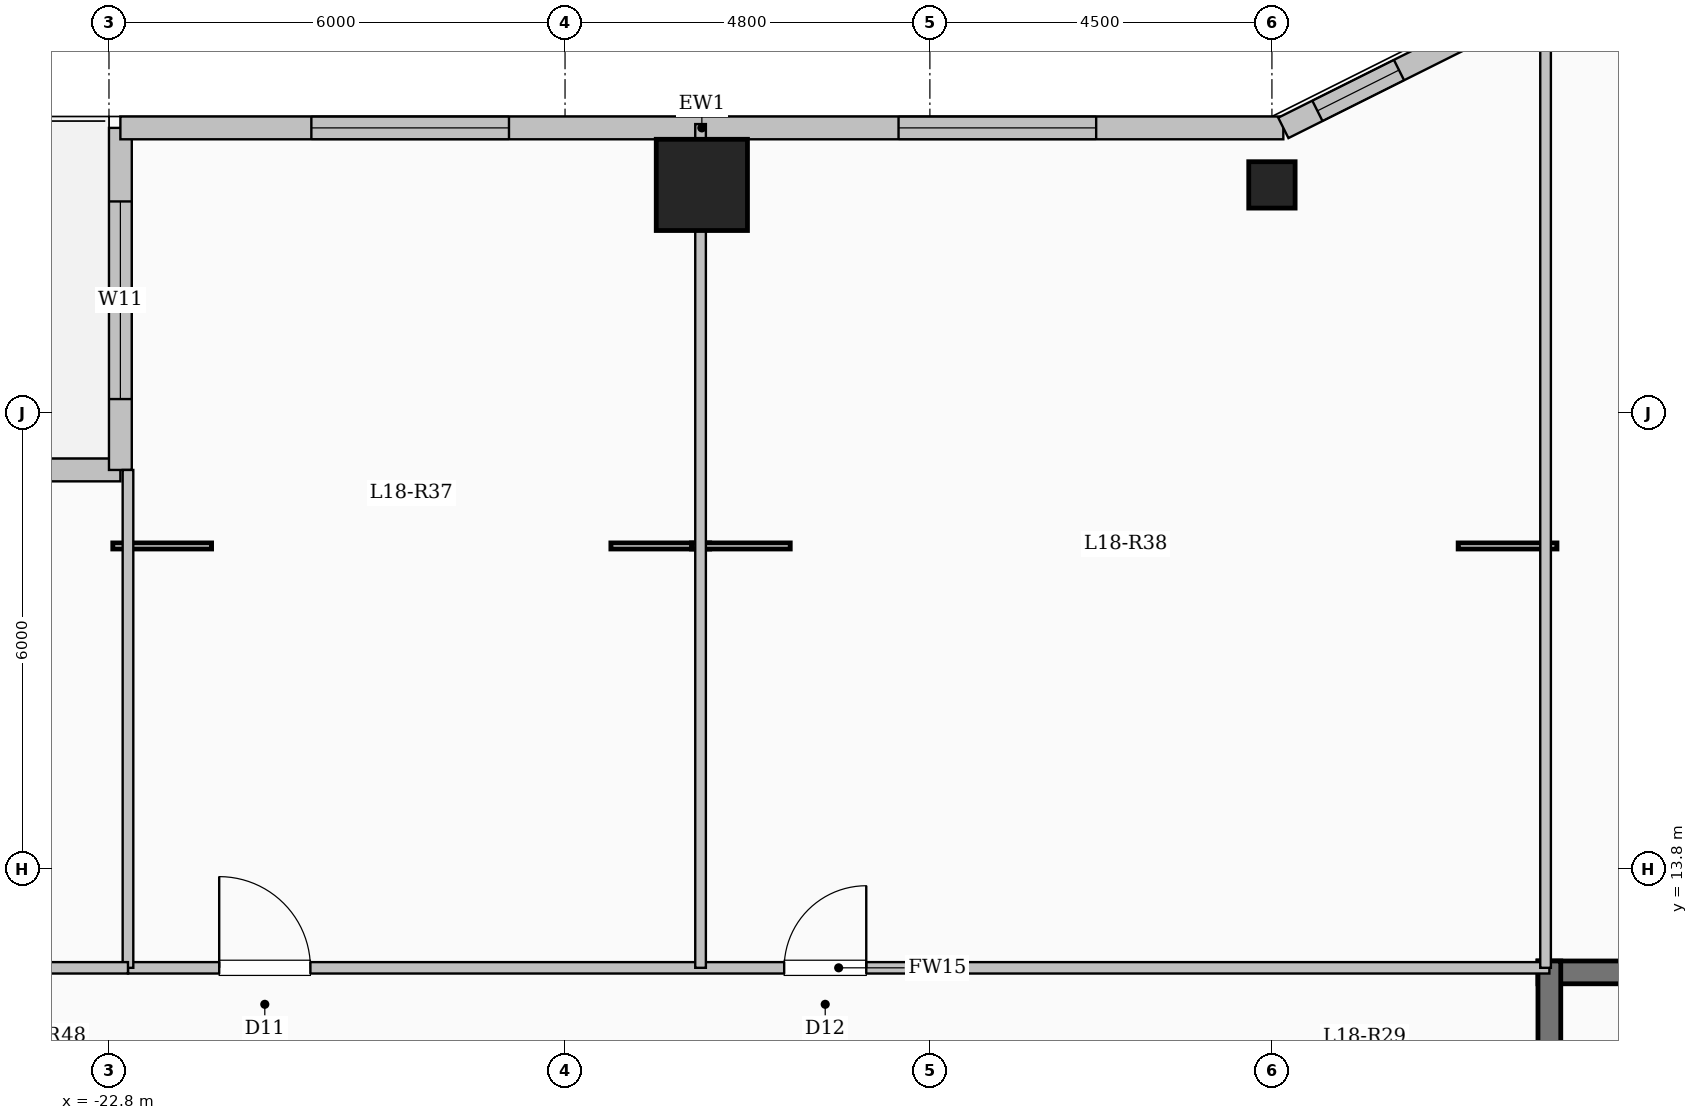
"""IFC4 building model, lengths in metres.
Left out: names, types, materials, properties, quantities, classifications, styles, units other than length and angle.
Written with IfcOpenShell. Run it as: python <this file> out.ifc"""

import sys

from ifc_helpers import new_model, si_unit, direction, frame, frame_2d, origin, origin_2d, place, context, subcontext, project, spatial, rectangle, hollow_circle, extrude, element, fill, save


model = new_model("IFC4")
c1 = context("Model", 3, precision=1e-05, world=origin(), true_north=direction((0.0, 1.0)))
c2 = subcontext(c1, "Body", "Model", "MODEL_VIEW")
j1 = project(units=[si_unit("LENGTHUNIT", "METRE"), si_unit("PLANEANGLEUNIT", "RADIAN")], contexts=[c1])
p1 = place(None, origin())
s1 = spatial("IfcSite", under=j1, at=p1, CompositionType="ELEMENT")
p2 = place(p1, origin())
s2 = spatial("IfcBuilding", under=s1, at=p2, CompositionType="ELEMENT")
p3 = place(p2, frame((0.0, 0.0, 68.7)))
s3 = spatial("IfcBuildingStorey", under=s2, at=p3, CompositionType="ELEMENT", Elevation=68.7)
p4 = place(p3, frame((-15.0, 22.8, 0.0), z_axis=(0.0, 0.0, 1.0), x_axis=(1.0, 0.0, 0.0)))
e1 = element("IfcColumn", 1, at=p4, inside=s3, PredefinedType="COLUMN", context=c2, shape_type="SweptSolid", body=[
    extrude(rectangle(XDim=1.2, YDim=1.2, at=origin_2d()), origin(), (0.0, 0.0, 1.0), 4.5),
])
p5 = place(p3, frame((-7.5, 22.8, 0.0), z_axis=(0.0, 0.0, 1.0), x_axis=(1.0, 0.0, 0.0)))
e2 = element("IfcColumn", 2, at=p5, inside=s3, PredefinedType="COLUMN", context=c2, shape_type="SweptSolid", body=[
    extrude(hollow_circle(Radius=0.305, WallThickness=0.025, at=origin_2d()), origin(), (0.0, 0.0, 1.0), 4.5),
])
p6 = place(p3, frame((-28.65, 19.05, 0.0), z_axis=(0.0, 0.0, 1.0), x_axis=(1.0, 0.0, 0.0)))
e3 = element("IfcWall", 3, at=p6, inside=s3, PredefinedType="SOLIDWALL", context=c2, shape_type="SweptSolid", body=[
    extrude(rectangle(XDim=6.0, YDim=0.3, at=frame_2d((3.0, 0.0))), origin(), (0.0, 0.0, 1.0), 4.2),
])
p7 = place(p6, frame((2.5, 0.0, 0.0)))
e4 = element("IfcOpeningElement", 4, at=p7, cuts=e3, PredefinedType="OPENING", context=c2, shape_type="SweptSolid", body=[
    extrude(rectangle(XDim=1.1, YDim=2.2, at=frame_2d((0.55, 1.1))), frame((0.0, 0.16, 0.0), z_axis=(0.0, -1.0, 0.0), x_axis=(1.0, 0.0, 0.0)), (0.0, 0.0, 1.0), 0.32),
])
p8 = place(p6, frame((0.755, 0.0, 0.95)))
e5 = element("IfcOpeningElement", 5, at=p8, cuts=e3, PredefinedType="OPENING", context=c2, shape_type="SweptSolid", body=[
    extrude(rectangle(XDim=1.2, YDim=1.5, at=frame_2d((0.6, 0.75))), frame((0.0, 0.16, 0.0), z_axis=(0.0, -1.0, 0.0), x_axis=(1.0, 0.0, 0.0)), (0.0, 0.0, 1.0), 0.32),
])
p9 = place(p3, frame((-22.65, 19.05, 0.0), z_axis=(0.0, 0.0, 1.0), x_axis=(0.0, 1.0, 0.0)))
e6 = element("IfcWall", 6, at=p9, inside=s3, PredefinedType="SOLIDWALL", context=c2, shape_type="SweptSolid", body=[
    extrude(rectangle(XDim=4.5, YDim=0.3, at=frame_2d((2.25, 0.0))), origin(), (0.0, 0.0, 1.0), 4.2),
])
p10 = place(p9, frame((0.933, 0.0, 0.85)))
e7 = element("IfcOpeningElement", 7, at=p10, cuts=e6, PredefinedType="OPENING", context=c2, shape_type="SweptSolid", body=[
    extrude(rectangle(XDim=2.6, YDim=2.4, at=frame_2d((1.3, 1.2))), frame((0.0, 0.16, 0.0), z_axis=(0.0, -1.0, 0.0), x_axis=(1.0, 0.0, 0.0)), (0.0, 0.0, 1.0), 0.32),
])
p11 = place(p3, frame((-22.65, 23.55, 0.0), z_axis=(0.0, 0.0, 1.0), x_axis=(1.0, 0.0, 0.0)))
e8 = element("IfcWall", 8, at=p11, inside=s3, PredefinedType="SOLIDWALL", context=c2, shape_type="SweptSolid", body=[
    extrude(rectangle(XDim=15.3, YDim=0.3, at=frame_2d((7.65, 0.0))), origin(), (0.0, 0.0, 1.0), 4.2),
])
p12 = place(p11, frame((2.512, 0.0, 0.85)))
e9 = element("IfcOpeningElement", 9, at=p12, cuts=e8, PredefinedType="OPENING", context=c2, shape_type="SweptSolid", body=[
    extrude(rectangle(XDim=2.6, YDim=2.4, at=frame_2d((1.3, 1.2))), frame((0.0, 0.16, 0.0), z_axis=(0.0, -1.0, 0.0), x_axis=(1.0, 0.0, 0.0)), (0.0, 0.0, 1.0), 0.32),
])
p13 = place(p11, frame((10.238, 0.0, 0.85)))
e10 = element("IfcOpeningElement", 10, at=p13, cuts=e8, PredefinedType="OPENING", context=c2, shape_type="SweptSolid", body=[
    extrude(rectangle(XDim=2.6, YDim=2.4, at=frame_2d((1.3, 1.2))), frame((0.0, 0.16, 0.0), z_axis=(0.0, -1.0, 0.0), x_axis=(1.0, 0.0, 0.0)), (0.0, 0.0, 1.0), 0.32),
])
p14 = place(p3, frame((-7.35, 23.55, 0.0), z_axis=(0.0, 0.0, 1.0), x_axis=(0.894427191, 0.4472135955, 0.0)))
e11 = element("IfcWall", 11, at=p14, inside=s3, PredefinedType="SOLIDWALL", context=c2, shape_type="SweptSolid", body=[
    extrude(rectangle(XDim=3.354, YDim=0.3, at=frame_2d((1.677, 0.0))), origin(), (0.0, 0.0, 1.0), 4.2),
])
p15 = place(p14, frame((0.501, 0.0, 0.95)))
e12 = element("IfcOpeningElement", 12, at=p15, cuts=e11, PredefinedType="OPENING", context=c2, shape_type="SweptSolid", body=[
    extrude(rectangle(XDim=1.2, YDim=1.5, at=frame_2d((0.6, 0.75))), frame((0.0, 0.16, 0.0), z_axis=(0.0, -1.0, 0.0), x_axis=(1.0, 0.0, 0.0)), (0.0, 0.0, 1.0), 0.32),
])
p16 = place(p3, frame((-4.0, 12.44, 0.0), z_axis=(0.0, 0.0, 1.0), x_axis=(1.0, 0.0, 0.0)))
e13 = element("IfcWall", 13, at=p16, inside=s3, PredefinedType="SHEAR", context=c2, shape_type="SweptSolid", body=[
    extrude(rectangle(XDim=8.0, YDim=0.3, at=frame_2d((4.0, 0.0))), origin(), (0.0, 0.0, 1.0), 4.5),
])
p17 = place(p3, frame((-3.85, 9.0, 0.0), z_axis=(0.0, 0.0, 1.0), x_axis=(0.0, 1.0, 0.0)))
e14 = element("IfcWall", 14, at=p17, inside=s3, PredefinedType="SHEAR", context=c2, shape_type="SweptSolid", body=[
    extrude(rectangle(XDim=3.59, YDim=0.3, at=frame_2d((1.795, 0.0))), origin(), (0.0, 0.0, 1.0), 4.5),
])
p18 = place(p3, frame((-22.55, 12.5, 0.0), z_axis=(0.0, 0.0, 1.0), x_axis=(1.0, 0.0, 0.0)))
e15 = element("IfcWall", 15, at=p18, inside=s3, PredefinedType="PARTITIONING", context=c2, shape_type="SweptSolid", body=[
    extrude(rectangle(XDim=18.7, YDim=0.15, at=frame_2d((9.35, 0.0))), origin(), (0.0, 0.0, 1.0), 4.2),
])
p19 = place(p18, frame((1.2, 0.0, 0.0)))
e16 = element("IfcOpeningElement", 16, at=p19, cuts=e15, PredefinedType="OPENING", context=c2, shape_type="SweptSolid", body=[
    extrude(rectangle(XDim=1.2, YDim=2.15, at=frame_2d((0.6, 1.075))), frame((0.0, 0.085, 0.0), z_axis=(0.0, -1.0, 0.0), x_axis=(1.0, 0.0, 0.0)), (0.0, 0.0, 1.0), 0.17),
])
p20 = place(p18, frame((8.633, 0.0, 0.0)))
e17 = element("IfcOpeningElement", 17, at=p20, cuts=e15, PredefinedType="OPENING", context=c2, shape_type="SweptSolid", body=[
    extrude(rectangle(XDim=1.08, YDim=2.15, at=frame_2d((0.54, 1.075))), frame((0.0, 0.085, 0.0), z_axis=(0.0, -1.0, 0.0), x_axis=(1.0, 0.0, 0.0)), (0.0, 0.0, 1.0), 0.17),
])
p21 = place(p3, frame((-3.9, 12.5, 0.0), z_axis=(0.0, 0.0, 1.0), x_axis=(0.0, 1.0, 0.0)))
e18 = element("IfcWall", 18, at=p21, inside=s3, PredefinedType="PARTITIONING", context=c2, shape_type="SweptSolid", body=[
    extrude(rectangle(XDim=12.58, YDim=0.14, at=frame_2d((6.29, 0.0))), origin(), (0.0, 0.0, 1.0), 4.2),
])
p22 = place(p3, frame((-15.017, 12.5, 0.0), z_axis=(0.0, 0.0, 1.0), x_axis=(0.0, 1.0, 0.0)))
e19 = element("IfcWall", 19, at=p22, inside=s3, PredefinedType="PARTITIONING", context=c2, shape_type="SweptSolid", body=[
    extrude(rectangle(XDim=11.1, YDim=0.14, at=frame_2d((5.55, 0.0))), origin(), (0.0, 0.0, 1.0), 3.535),
])
p23 = place(p3, frame((-22.55, 12.5, 0.0), z_axis=(0.0, 0.0, 1.0), x_axis=(0.0, 1.0, 0.0)))
e20 = element("IfcWall", 20, at=p23, inside=s3, PredefinedType="PARTITIONING", context=c2, shape_type="SweptSolid", body=[
    extrude(rectangle(XDim=6.55, YDim=0.14, at=frame_2d((3.275, 0.0))), origin(), (0.0, 0.0, 1.0), 4.2),
])
p24 = place(p3, frame((-28.68, 12.5, 0.0), z_axis=(0.0, 0.0, 1.0), x_axis=(1.0, 0.0, 0.0)))
e21 = element("IfcWall", 21, at=p24, inside=s3, PredefinedType="PARTITIONING", context=c2, shape_type="SweptSolid", body=[
    extrude(rectangle(XDim=6.13, YDim=0.15, at=frame_2d((3.065, 0.0))), origin(), (0.0, 0.0, 1.0), 4.2),
])
p25 = place(p24, frame((2.59, 0.0, 0.0)))
e22 = element("IfcOpeningElement", 22, at=p25, cuts=e21, PredefinedType="OPENING", context=c2, shape_type="SweptSolid", body=[
    extrude(rectangle(XDim=0.95, YDim=2.15, at=frame_2d((0.475, 1.075))), frame((0.0, 0.085, 0.0), z_axis=(0.0, -1.0, 0.0), x_axis=(1.0, 0.0, 0.0)), (0.0, 0.0, 1.0), 0.17),
])
p26 = place(p10, origin())
e23 = element("IfcWindow", 23, at=p26, inside=s3, PartitioningType="SINGLE_PANEL", PredefinedType="WINDOW", context=c2, shape_type="SweptSolid", body=[
    extrude(rectangle(XDim=2.6, YDim=2.4, at=frame_2d((1.3, 1.2))), frame((0.0, 0.03, 0.0), z_axis=(0.0, -1.0, 0.0), x_axis=(1.0, 0.0, 0.0)), (0.0, 0.0, 1.0), 0.06),
])
fill(e7, e23)
p27 = place(p12, origin())
e24 = element("IfcWindow", 24, at=p27, inside=s3, PartitioningType="SINGLE_PANEL", PredefinedType="WINDOW", context=c2, shape_type="SweptSolid", body=[
    extrude(rectangle(XDim=2.6, YDim=2.4, at=frame_2d((1.3, 1.2))), frame((0.0, 0.03, 0.0), z_axis=(0.0, -1.0, 0.0), x_axis=(1.0, 0.0, 0.0)), (0.0, 0.0, 1.0), 0.06),
])
fill(e9, e24)
p28 = place(p13, origin())
e25 = element("IfcWindow", 25, at=p28, inside=s3, PartitioningType="SINGLE_PANEL", PredefinedType="WINDOW", context=c2, shape_type="SweptSolid", body=[
    extrude(rectangle(XDim=2.6, YDim=2.4, at=frame_2d((1.3, 1.2))), frame((0.0, 0.03, 0.0), z_axis=(0.0, -1.0, 0.0), x_axis=(1.0, 0.0, 0.0)), (0.0, 0.0, 1.0), 0.06),
])
fill(e10, e25)
p29 = place(p15, origin())
e26 = element("IfcWindow", 26, at=p29, inside=s3, PartitioningType="SINGLE_PANEL", PredefinedType="WINDOW", context=c2, shape_type="SweptSolid", body=[
    extrude(rectangle(XDim=1.2, YDim=1.5, at=frame_2d((0.6, 0.75))), frame((0.0, 0.03, 0.0), z_axis=(0.0, -1.0, 0.0), x_axis=(1.0, 0.0, 0.0)), (0.0, 0.0, 1.0), 0.06),
])
fill(e12, e26)
p30 = place(p19, origin())
e27 = element("IfcDoor", 27, at=p30, inside=s3, OperationType="SINGLE_SWING_LEFT", PredefinedType="DOOR", context=c2, shape_type="SweptSolid", body=[
    extrude(rectangle(XDim=1.2, YDim=2.15, at=frame_2d((0.6, 1.075))), frame((0.0, 0.025, 0.0), z_axis=(0.0, -1.0, 0.0), x_axis=(1.0, 0.0, 0.0)), (0.0, 0.0, 1.0), 0.05),
])
fill(e16, e27)
p31 = place(p20, origin())
e28 = element("IfcDoor", 28, at=p31, inside=s3, OperationType="SINGLE_SWING_RIGHT", PredefinedType="DOOR", context=c2, shape_type="SweptSolid", body=[
    extrude(rectangle(XDim=1.08, YDim=2.15, at=frame_2d((0.54, 1.075))), frame((0.0, 0.025, 0.0), z_axis=(0.0, -1.0, 0.0), x_axis=(1.0, 0.0, 0.0)), (0.0, 0.0, 1.0), 0.05),
])
fill(e17, e28)
save(model, sys.argv[1])
